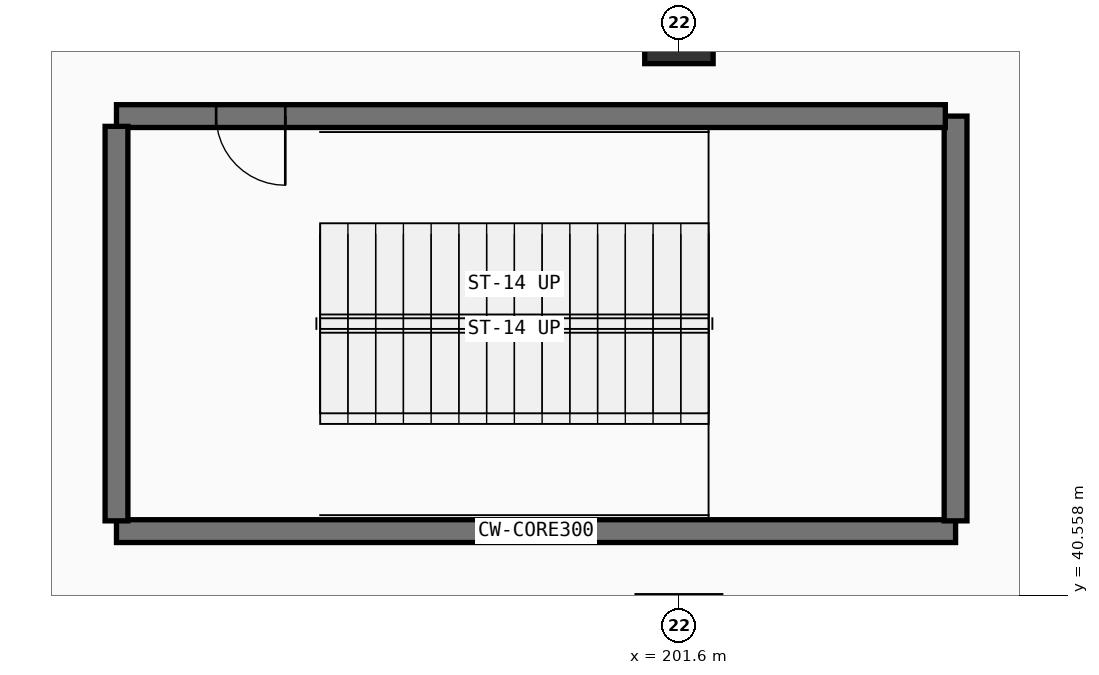
"""IFC4 building model, lengths in metres.
Left out: names, types, materials, properties, quantities, classifications, styles, units other than length and angle.
Written with IfcOpenShell. Run it as: python <this file> out.ifc"""

import sys

from ifc_helpers import new_model, si_unit, direction, frame, frame_2d, origin, origin_2d, place, context, subcontext, project, spatial, rectangle, extrude, element, fill, save


model = new_model("IFC4")
c1 = context("Model", 3, precision=1e-05, world=origin(), true_north=direction((0.0, 1.0)))
c2 = subcontext(c1, "Body", "Model", "MODEL_VIEW")
j1 = project(units=[si_unit("LENGTHUNIT", "METRE"), si_unit("PLANEANGLEUNIT", "RADIAN")], contexts=[c1])
p1 = place(None, origin())
s1 = spatial("IfcSite", under=j1, at=p1, CompositionType="ELEMENT")
p2 = place(p1, origin())
s2 = spatial("IfcBuilding", under=s1, at=p2, CompositionType="ELEMENT")
p3 = place(p2, frame((0.0, 0.0, -5.4)))
s3 = spatial("IfcBuildingStorey", under=s2, at=p3, CompositionType="ELEMENT", Elevation=-5.4)
p4 = place(p3, frame((201.6, 48.0, 0.0), z_axis=(0.0, 0.0, 1.0), x_axis=(1.0, 0.0, 0.0)))
e1 = element("IfcColumn", 1, at=p4, inside=s3, PredefinedType="COLUMN", context=c2, shape_type="SweptSolid", body=[
    extrude(rectangle(XDim=0.9, YDim=0.9, at=origin_2d()), origin(), (0.0, 0.0, 1.0), 5.4),
])
p5 = place(p3, frame((194.2, 41.4, 0.0), z_axis=(0.0, 0.0, 1.0), x_axis=(1.0, 0.0, 0.0)))
e2 = element("IfcWall", 2, at=p5, inside=s3, PredefinedType="SHEAR", context=c2, shape_type="SweptSolid", body=[
    extrude(rectangle(XDim=11.04, YDim=0.3, at=frame_2d((5.52, 0.0))), origin(), (0.0, 0.0, 1.0), 5.04),
])
p6 = place(p3, frame((205.24, 41.535, 0.0), z_axis=(0.0, 0.0, 1.0), x_axis=(0.0, 1.0, 0.0)))
e3 = element("IfcWall", 3, at=p6, inside=s3, PredefinedType="SHEAR", context=c2, shape_type="SweptSolid", body=[
    extrude(rectangle(XDim=5.325, YDim=0.3, at=frame_2d((2.663, 0.0))), origin(), (0.0, 0.0, 1.0), 5.04),
])
p7 = place(p3, frame((205.105, 46.86, 0.0), z_axis=(0.0, 0.0, 1.0), x_axis=(-1.0, 0.0, 0.0)))
e4 = element("IfcWall", 4, at=p7, inside=s3, PredefinedType="SHEAR", context=c2, shape_type="SweptSolid", body=[
    extrude(rectangle(XDim=10.905, YDim=0.3, at=frame_2d((5.453, 0.0))), origin(), (0.0, 0.0, 1.0), 5.04),
])
p8 = place(p7, frame((8.684, 0.0, 0.0)))
e5 = element("IfcOpeningElement", 5, at=p8, cuts=e4, PredefinedType="OPENING", context=c2, shape_type="SweptSolid", body=[
    extrude(rectangle(XDim=0.91, YDim=2.08, at=frame_2d((0.455, 1.04))), frame((0.0, 0.16, 0.0), z_axis=(0.0, -1.0, 0.0), x_axis=(1.0, 0.0, 0.0)), (0.0, 0.0, 1.0), 0.32),
])
p9 = place(p3, frame((194.2, 46.725, 0.0), z_axis=(0.0, 0.0, 1.0), x_axis=(0.0, -1.0, 0.0)))
e6 = element("IfcWall", 6, at=p9, inside=s3, PredefinedType="SHEAR", context=c2, shape_type="SweptSolid", body=[
    extrude(rectangle(XDim=5.19, YDim=0.3, at=frame_2d((2.595, 0.0))), origin(), (0.0, 0.0, 1.0), 5.04),
])
p10 = place(p8, origin())
e7 = element("IfcDoor", 7, at=p10, inside=s3, OperationType="SINGLE_SWING_RIGHT", PredefinedType="DOOR", context=c2, shape_type="SweptSolid", body=[
    extrude(rectangle(XDim=0.91, YDim=2.08, at=frame_2d((0.455, 1.04))), frame((0.0, 0.025, 0.0), z_axis=(0.0, -1.0, 0.0), x_axis=(1.0, 0.0, 0.0)), (0.0, 0.0, 1.0), 0.05),
])
fill(e5, e7)
save(model, sys.argv[1])
